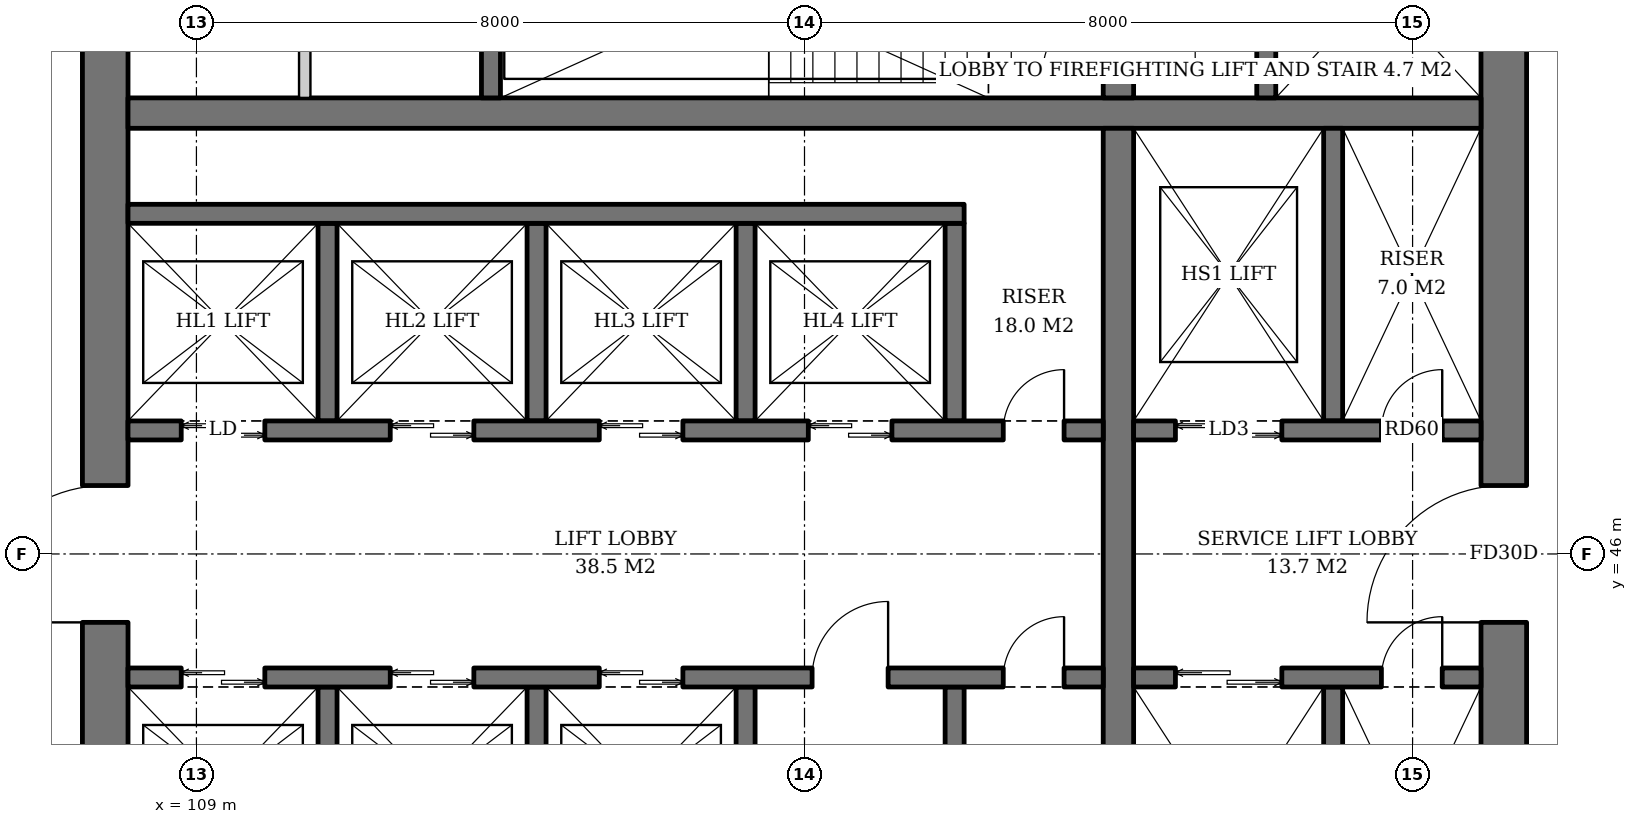
"""IFC4 building model, lengths in metres.
Left out: names, types, materials, properties, quantities, classifications, styles, units other than length and angle.
Written with IfcOpenShell. Run it as: python <this file> out.ifc"""

import sys

from ifc_helpers import new_model, si_unit, direction, frame, frame_2d, origin, place, context, subcontext, project, spatial, rectangle, extrude, element, fill, save


model = new_model("IFC4")
c1 = context("Model", 3, precision=1e-05, world=origin(), true_north=direction((0.0, 1.0)))
c2 = subcontext(c1, "Body", "Model", "MODEL_VIEW")
j1 = project(units=[si_unit("LENGTHUNIT", "METRE"), si_unit("PLANEANGLEUNIT", "RADIAN")], contexts=[c1])
p1 = place(None, origin())
s1 = spatial("IfcSite", under=j1, at=p1, CompositionType="ELEMENT")
p2 = place(p1, origin())
s2 = spatial("IfcBuilding", under=s1, at=p2, CompositionType="ELEMENT")
p3 = place(p2, frame((0.0, 0.0, 32.4)))
s3 = spatial("IfcBuildingStorey", under=s2, at=p3, CompositionType="ELEMENT", Elevation=32.4)
p4 = place(p3, frame((107.8, 37.1, 0.0), z_axis=(0.0, 0.0, 1.0), x_axis=(0.0, 1.0, 0.0)))
e1 = element("IfcWall", 1, at=p4, inside=s3, PredefinedType="SHEAR", context=c2, shape_type="SweptSolid", body=[
    extrude(rectangle(XDim=17.8, YDim=0.6, at=frame_2d((8.9, 0.0))), origin(), (0.0, 0.0, 1.0), 3.8),
])
p5 = place(p4, frame((8.0, 0.0, 0.0)))
e2 = element("IfcOpeningElement", 2, at=p5, cuts=e1, PredefinedType="OPENING", context=c2, shape_type="SweptSolid", body=[
    extrude(rectangle(XDim=1.8, YDim=2.4, at=frame_2d((0.9, 1.2))), frame((0.0, 0.31, 0.0), z_axis=(0.0, -1.0, 0.0), x_axis=(1.0, 0.0, 0.0)), (0.0, 0.0, 1.0), 0.62),
])
p6 = place(p3, frame((126.2, 37.1, 0.0), z_axis=(0.0, 0.0, 1.0), x_axis=(0.0, 1.0, 0.0)))
e3 = element("IfcWall", 3, at=p6, inside=s3, PredefinedType="SHEAR", context=c2, shape_type="SweptSolid", body=[
    extrude(rectangle(XDim=17.8, YDim=0.6, at=frame_2d((8.9, 0.0))), origin(), (0.0, 0.0, 1.0), 3.8),
])
p7 = place(p6, frame((8.0, 0.0, 0.0)))
e4 = element("IfcOpeningElement", 4, at=p7, cuts=e3, PredefinedType="OPENING", context=c2, shape_type="SweptSolid", body=[
    extrude(rectangle(XDim=1.8, YDim=2.4, at=frame_2d((0.9, 1.2))), frame((0.0, 0.31, 0.0), z_axis=(0.0, -1.0, 0.0), x_axis=(1.0, 0.0, 0.0)), (0.0, 0.0, 1.0), 0.62),
])
p8 = place(p3, frame((108.1, 51.8, 0.0), z_axis=(0.0, 0.0, 1.0), x_axis=(1.0, 0.0, 0.0)))
e5 = element("IfcWall", 5, at=p8, inside=s3, PredefinedType="SHEAR", context=c2, shape_type="SweptSolid", body=[
    extrude(rectangle(XDim=17.8, YDim=0.4, at=frame_2d((8.9, 0.0))), origin(), (0.0, 0.0, 1.0), 3.8),
])
p9 = place(p3, frame((121.13, 40.4, 0.0), z_axis=(0.0, 0.0, 1.0), x_axis=(0.0, 1.0, 0.0)))
e6 = element("IfcWall", 6, at=p9, inside=s3, PredefinedType="SHEAR", context=c2, shape_type="SweptSolid", body=[
    extrude(rectangle(XDim=11.2, YDim=0.4, at=frame_2d((5.6, 0.0))), origin(), (0.0, 0.0, 1.0), 3.8),
])
p10 = place(p3, frame((121.13, 52.0, 0.0), z_axis=(0.0, 0.0, 1.0), x_axis=(0.0, 1.0, 0.0)))
e7 = element("IfcWall", 7, at=p10, inside=s3, PredefinedType="SHEAR", context=c2, shape_type="SweptSolid", body=[
    extrude(rectangle(XDim=2.9, YDim=0.4, at=frame_2d((1.45, 0.0))), origin(), (0.0, 0.0, 1.0), 3.8),
])
p11 = place(p10, frame((0.3, 0.0, 0.0)))
e8 = element("IfcOpeningElement", 8, at=p11, cuts=e7, PredefinedType="OPENING", context=c2, shape_type="SweptSolid", body=[
    extrude(rectangle(XDim=1.0, YDim=2.1, at=frame_2d((0.5, 1.05))), frame((0.0, 0.21, 0.0), z_axis=(0.0, -1.0, 0.0), x_axis=(1.0, 0.0, 0.0)), (0.0, 0.0, 1.0), 0.42),
])
p12 = place(p3, frame((112.875, 52.0, 0.0), z_axis=(0.0, 0.0, 1.0), x_axis=(0.0, 1.0, 0.0)))
e9 = element("IfcWall", 9, at=p12, inside=s3, PredefinedType="SHEAR", context=c2, shape_type="SweptSolid", body=[
    extrude(rectangle(XDim=2.9, YDim=0.25, at=frame_2d((1.45, 0.0))), origin(), (0.0, 0.0, 1.0), 3.8),
])
p13 = place(p3, frame((123.075, 52.0, 0.0), z_axis=(0.0, 0.0, 1.0), x_axis=(0.0, 1.0, 0.0)))
e10 = element("IfcWall", 10, at=p13, inside=s3, PredefinedType="SHEAR", context=c2, shape_type="SweptSolid", body=[
    extrude(rectangle(XDim=2.9, YDim=0.25, at=frame_2d((1.45, 0.0))), origin(), (0.0, 0.0, 1.0), 3.8),
])
p14 = place(p13, frame((0.8, 0.0, 0.0)))
e11 = element("IfcOpeningElement", 11, at=p14, cuts=e10, PredefinedType="OPENING", context=c2, shape_type="SweptSolid", body=[
    extrude(rectangle(XDim=1.3, YDim=2.2, at=frame_2d((0.65, 1.1))), frame((0.0, 0.135, 0.0), z_axis=(0.0, -1.0, 0.0), x_axis=(1.0, 0.0, 0.0)), (0.0, 0.0, 1.0), 0.27),
])
for number, where, z_axis, x_axis in (
    (12, (110.725, 47.75, 0.0), (0.0, 0.0, 1.0), (0.0, 1.0, 0.0)),
    (13, (113.475, 47.75, 0.0), (0.0, 0.0, 1.0), (0.0, 1.0, 0.0)),
    (14, (116.225, 47.75, 0.0), (0.0, 0.0, 1.0), (0.0, 1.0, 0.0)),
    (15, (118.975, 47.75, 0.0), (0.0, 0.0, 1.0), (0.0, 1.0, 0.0)),
):
    element("IfcWall", number, at=place(p3, frame(where, z_axis=z_axis, x_axis=x_axis)), inside=s3, PredefinedType="SHEAR", context=c2, shape_type="SweptSolid", body=[
        extrude(rectangle(XDim=2.6, YDim=0.25, at=frame_2d((1.3, 0.0))), origin(), (0.0, 0.0, 1.0), 3.8),
    ])
p15 = place(p3, frame((108.1, 50.475, 0.0), z_axis=(0.0, 0.0, 1.0), x_axis=(1.0, 0.0, 0.0)))
e16 = element("IfcWall", 16, at=p15, inside=s3, PredefinedType="SHEAR", context=c2, shape_type="SweptSolid", body=[
    extrude(rectangle(XDim=11.0, YDim=0.25, at=frame_2d((5.5, 0.0))), origin(), (0.0, 0.0, 1.0), 3.8),
])
p16 = place(p3, frame((108.1, 47.625, 0.0), z_axis=(0.0, 0.0, 1.0), x_axis=(1.0, 0.0, 0.0)))
e17 = element("IfcWall", 17, at=p16, inside=s3, PredefinedType="SHEAR", context=c2, shape_type="SweptSolid", body=[
    extrude(rectangle(XDim=12.83, YDim=0.25, at=frame_2d((6.415, 0.0))), origin(), (0.0, 0.0, 1.0), 3.8),
])
p17 = place(p16, frame((0.7, 0.0, 0.0)))
e18 = element("IfcOpeningElement", 18, at=p17, cuts=e17, PredefinedType="OPENING", context=c2, shape_type="SweptSolid", body=[
    extrude(rectangle(XDim=1.1, YDim=2.2, at=frame_2d((0.55, 1.1))), frame((0.0, 0.135, 0.0), z_axis=(0.0, -1.0, 0.0), x_axis=(1.0, 0.0, 0.0)), (0.0, 0.0, 1.0), 0.27),
])
p18 = place(p16, frame((3.45, 0.0, 0.0)))
e19 = element("IfcOpeningElement", 19, at=p18, cuts=e17, PredefinedType="OPENING", context=c2, shape_type="SweptSolid", body=[
    extrude(rectangle(XDim=1.1, YDim=2.2, at=frame_2d((0.55, 1.1))), frame((0.0, 0.135, 0.0), z_axis=(0.0, -1.0, 0.0), x_axis=(1.0, 0.0, 0.0)), (0.0, 0.0, 1.0), 0.27),
])
p19 = place(p16, frame((6.2, 0.0, 0.0)))
e20 = element("IfcOpeningElement", 20, at=p19, cuts=e17, PredefinedType="OPENING", context=c2, shape_type="SweptSolid", body=[
    extrude(rectangle(XDim=1.1, YDim=2.2, at=frame_2d((0.55, 1.1))), frame((0.0, 0.135, 0.0), z_axis=(0.0, -1.0, 0.0), x_axis=(1.0, 0.0, 0.0)), (0.0, 0.0, 1.0), 0.27),
])
p20 = place(p16, frame((8.95, 0.0, 0.0)))
e21 = element("IfcOpeningElement", 21, at=p20, cuts=e17, PredefinedType="OPENING", context=c2, shape_type="SweptSolid", body=[
    extrude(rectangle(XDim=1.1, YDim=2.2, at=frame_2d((0.55, 1.1))), frame((0.0, 0.135, 0.0), z_axis=(0.0, -1.0, 0.0), x_axis=(1.0, 0.0, 0.0)), (0.0, 0.0, 1.0), 0.27),
])
p21 = place(p16, frame((11.515, 0.0, 0.0)))
e22 = element("IfcOpeningElement", 22, at=p21, cuts=e17, PredefinedType="OPENING", context=c2, shape_type="SweptSolid", body=[
    extrude(rectangle(XDim=0.8, YDim=2.0, at=frame_2d((0.4, 1.0))), frame((0.0, 0.135, 0.0), z_axis=(0.0, -1.0, 0.0), x_axis=(1.0, 0.0, 0.0)), (0.0, 0.0, 1.0), 0.27),
])
for number, where, z_axis, x_axis in (
    (23, (110.725, 44.25, 0.0), (0.0, 0.0, 1.0), (0.0, -1.0, 0.0)),
    (24, (113.475, 44.25, 0.0), (0.0, 0.0, 1.0), (0.0, -1.0, 0.0)),
    (25, (116.225, 44.25, 0.0), (0.0, 0.0, 1.0), (0.0, -1.0, 0.0)),
    (26, (118.975, 44.25, 0.0), (0.0, 0.0, 1.0), (0.0, -1.0, 0.0)),
):
    element("IfcWall", number, at=place(p3, frame(where, z_axis=z_axis, x_axis=x_axis)), inside=s3, PredefinedType="SHEAR", context=c2, shape_type="SweptSolid", body=[
        extrude(rectangle(XDim=2.6, YDim=0.25, at=frame_2d((1.3, 0.0))), origin(), (0.0, 0.0, 1.0), 3.8),
    ])
p22 = place(p3, frame((108.1, 44.375, 0.0), z_axis=(0.0, 0.0, 1.0), x_axis=(1.0, 0.0, 0.0)))
e27 = element("IfcWall", 27, at=p22, inside=s3, PredefinedType="SHEAR", context=c2, shape_type="SweptSolid", body=[
    extrude(rectangle(XDim=12.83, YDim=0.25, at=frame_2d((6.415, 0.0))), origin(), (0.0, 0.0, 1.0), 3.8),
])
p23 = place(p22, frame((0.7, 0.0, 0.0)))
e28 = element("IfcOpeningElement", 28, at=p23, cuts=e27, PredefinedType="OPENING", context=c2, shape_type="SweptSolid", body=[
    extrude(rectangle(XDim=1.1, YDim=2.2, at=frame_2d((0.55, 1.1))), frame((0.0, 0.135, 0.0), z_axis=(0.0, -1.0, 0.0), x_axis=(1.0, 0.0, 0.0)), (0.0, 0.0, 1.0), 0.27),
])
p24 = place(p22, frame((3.45, 0.0, 0.0)))
e29 = element("IfcOpeningElement", 29, at=p24, cuts=e27, PredefinedType="OPENING", context=c2, shape_type="SweptSolid", body=[
    extrude(rectangle(XDim=1.1, YDim=2.2, at=frame_2d((0.55, 1.1))), frame((0.0, 0.135, 0.0), z_axis=(0.0, -1.0, 0.0), x_axis=(1.0, 0.0, 0.0)), (0.0, 0.0, 1.0), 0.27),
])
p25 = place(p22, frame((6.2, 0.0, 0.0)))
e30 = element("IfcOpeningElement", 30, at=p25, cuts=e27, PredefinedType="OPENING", context=c2, shape_type="SweptSolid", body=[
    extrude(rectangle(XDim=1.1, YDim=2.2, at=frame_2d((0.55, 1.1))), frame((0.0, 0.135, 0.0), z_axis=(0.0, -1.0, 0.0), x_axis=(1.0, 0.0, 0.0)), (0.0, 0.0, 1.0), 0.27),
])
p26 = place(p22, frame((9.0, 0.0, 0.0)))
e31 = element("IfcOpeningElement", 31, at=p26, cuts=e27, PredefinedType="OPENING", context=c2, shape_type="SweptSolid", body=[
    extrude(rectangle(XDim=1.0, YDim=2.1, at=frame_2d((0.5, 1.05))), frame((0.0, 0.135, 0.0), z_axis=(0.0, -1.0, 0.0), x_axis=(1.0, 0.0, 0.0)), (0.0, 0.0, 1.0), 0.27),
])
p27 = place(p22, frame((11.515, 0.0, 0.0)))
e32 = element("IfcOpeningElement", 32, at=p27, cuts=e27, PredefinedType="OPENING", context=c2, shape_type="SweptSolid", body=[
    extrude(rectangle(XDim=0.8, YDim=2.0, at=frame_2d((0.4, 1.0))), frame((0.0, 0.135, 0.0), z_axis=(0.0, -1.0, 0.0), x_axis=(1.0, 0.0, 0.0)), (0.0, 0.0, 1.0), 0.27),
])
p28 = place(p3, frame((123.955, 47.75, 0.0), z_axis=(0.0, 0.0, 1.0), x_axis=(0.0, 1.0, 0.0)))
e33 = element("IfcWall", 33, at=p28, inside=s3, PredefinedType="SHEAR", context=c2, shape_type="SweptSolid", body=[
    extrude(rectangle(XDim=3.85, YDim=0.25, at=frame_2d((1.925, 0.0))), origin(), (0.0, 0.0, 1.0), 3.8),
])
p29 = place(p3, frame((121.33, 47.625, 0.0), z_axis=(0.0, 0.0, 1.0), x_axis=(1.0, 0.0, 0.0)))
e34 = element("IfcWall", 34, at=p29, inside=s3, PredefinedType="SHEAR", context=c2, shape_type="SweptSolid", body=[
    extrude(rectangle(XDim=4.57, YDim=0.25, at=frame_2d((2.285, 0.0))), origin(), (0.0, 0.0, 1.0), 3.8),
])
p30 = place(p29, frame((0.55, 0.0, 0.0)))
e35 = element("IfcOpeningElement", 35, at=p30, cuts=e34, PredefinedType="OPENING", context=c2, shape_type="SweptSolid", body=[
    extrude(rectangle(XDim=1.4, YDim=2.4, at=frame_2d((0.7, 1.2))), frame((0.0, 0.135, 0.0), z_axis=(0.0, -1.0, 0.0), x_axis=(1.0, 0.0, 0.0)), (0.0, 0.0, 1.0), 0.27),
])
p31 = place(p29, frame((3.26, 0.0, 0.0)))
e36 = element("IfcOpeningElement", 36, at=p31, cuts=e34, PredefinedType="OPENING", context=c2, shape_type="SweptSolid", body=[
    extrude(rectangle(XDim=0.8, YDim=2.0, at=frame_2d((0.4, 1.0))), frame((0.0, 0.135, 0.0), z_axis=(0.0, -1.0, 0.0), x_axis=(1.0, 0.0, 0.0)), (0.0, 0.0, 1.0), 0.27),
])
p32 = place(p3, frame((123.955, 44.25, 0.0), z_axis=(0.0, 0.0, 1.0), x_axis=(0.0, -1.0, 0.0)))
e37 = element("IfcWall", 37, at=p32, inside=s3, PredefinedType="SHEAR", context=c2, shape_type="SweptSolid", body=[
    extrude(rectangle(XDim=3.85, YDim=0.25, at=frame_2d((1.925, 0.0))), origin(), (0.0, 0.0, 1.0), 3.8),
])
p33 = place(p3, frame((121.33, 44.375, 0.0), z_axis=(0.0, 0.0, 1.0), x_axis=(1.0, 0.0, 0.0)))
e38 = element("IfcWall", 38, at=p33, inside=s3, PredefinedType="SHEAR", context=c2, shape_type="SweptSolid", body=[
    extrude(rectangle(XDim=4.57, YDim=0.25, at=frame_2d((2.285, 0.0))), origin(), (0.0, 0.0, 1.0), 3.8),
])
p34 = place(p33, frame((0.55, 0.0, 0.0)))
e39 = element("IfcOpeningElement", 39, at=p34, cuts=e38, PredefinedType="OPENING", context=c2, shape_type="SweptSolid", body=[
    extrude(rectangle(XDim=1.4, YDim=2.4, at=frame_2d((0.7, 1.2))), frame((0.0, 0.135, 0.0), z_axis=(0.0, -1.0, 0.0), x_axis=(1.0, 0.0, 0.0)), (0.0, 0.0, 1.0), 0.27),
])
p35 = place(p33, frame((3.26, 0.0, 0.0)))
e40 = element("IfcOpeningElement", 40, at=p35, cuts=e38, PredefinedType="OPENING", context=c2, shape_type="SweptSolid", body=[
    extrude(rectangle(XDim=0.8, YDim=2.0, at=frame_2d((0.4, 1.0))), frame((0.0, 0.135, 0.0), z_axis=(0.0, -1.0, 0.0), x_axis=(1.0, 0.0, 0.0)), (0.0, 0.0, 1.0), 0.27),
])
p36 = place(p3, frame((110.425, 52.0, 0.0), z_axis=(0.0, 0.0, 1.0), x_axis=(0.0, 1.0, 0.0)))
e41 = element("IfcWall", 41, at=p36, inside=s3, PredefinedType="SOLIDWALL", context=c2, shape_type="SweptSolid", body=[
    extrude(rectangle(XDim=2.9, YDim=0.15, at=frame_2d((1.45, 0.0))), origin(), (0.0, 0.0, 1.0), 3.6),
])
p37 = place(p17, origin())
e42 = element("IfcDoor", 42, at=p37, inside=s3, OperationType="DOUBLE_DOOR_SLIDING", PredefinedType="DOOR", context=c2, shape_type="SweptSolid", body=[
    extrude(rectangle(XDim=1.1, YDim=2.2, at=frame_2d((0.55, 1.1))), frame((0.0, 0.025, 0.0), z_axis=(0.0, -1.0, 0.0), x_axis=(1.0, 0.0, 0.0)), (0.0, 0.0, 1.0), 0.05),
])
fill(e18, e42)
p38 = place(p18, origin())
e43 = element("IfcDoor", 43, at=p38, inside=s3, OperationType="DOUBLE_DOOR_SLIDING", PredefinedType="DOOR", context=c2, shape_type="SweptSolid", body=[
    extrude(rectangle(XDim=1.1, YDim=2.2, at=frame_2d((0.55, 1.1))), frame((0.0, 0.025, 0.0), z_axis=(0.0, -1.0, 0.0), x_axis=(1.0, 0.0, 0.0)), (0.0, 0.0, 1.0), 0.05),
])
fill(e19, e43)
p39 = place(p19, origin())
e44 = element("IfcDoor", 44, at=p39, inside=s3, OperationType="DOUBLE_DOOR_SLIDING", PredefinedType="DOOR", context=c2, shape_type="SweptSolid", body=[
    extrude(rectangle(XDim=1.1, YDim=2.2, at=frame_2d((0.55, 1.1))), frame((0.0, 0.025, 0.0), z_axis=(0.0, -1.0, 0.0), x_axis=(1.0, 0.0, 0.0)), (0.0, 0.0, 1.0), 0.05),
])
fill(e20, e44)
p40 = place(p20, origin())
e45 = element("IfcDoor", 45, at=p40, inside=s3, OperationType="DOUBLE_DOOR_SLIDING", PredefinedType="DOOR", context=c2, shape_type="SweptSolid", body=[
    extrude(rectangle(XDim=1.1, YDim=2.2, at=frame_2d((0.55, 1.1))), frame((0.0, 0.025, 0.0), z_axis=(0.0, -1.0, 0.0), x_axis=(1.0, 0.0, 0.0)), (0.0, 0.0, 1.0), 0.05),
])
fill(e21, e45)
p41 = place(p21, origin())
e46 = element("IfcDoor", 46, at=p41, inside=s3, OperationType="SINGLE_SWING_RIGHT", PredefinedType="DOOR", context=c2, shape_type="SweptSolid", body=[
    extrude(rectangle(XDim=0.8, YDim=2.0, at=frame_2d((0.4, 1.0))), frame((0.0, 0.025, 0.0), z_axis=(0.0, -1.0, 0.0), x_axis=(1.0, 0.0, 0.0)), (0.0, 0.0, 1.0), 0.05),
])
fill(e22, e46)
p42 = place(p23, origin())
e47 = element("IfcDoor", 47, at=p42, inside=s3, OperationType="DOUBLE_DOOR_SLIDING", PredefinedType="DOOR", context=c2, shape_type="SweptSolid", body=[
    extrude(rectangle(XDim=1.1, YDim=2.2, at=frame_2d((0.55, 1.1))), frame((0.0, 0.025, 0.0), z_axis=(0.0, -1.0, 0.0), x_axis=(1.0, 0.0, 0.0)), (0.0, 0.0, 1.0), 0.05),
])
fill(e28, e47)
p43 = place(p24, origin())
e48 = element("IfcDoor", 48, at=p43, inside=s3, OperationType="DOUBLE_DOOR_SLIDING", PredefinedType="DOOR", context=c2, shape_type="SweptSolid", body=[
    extrude(rectangle(XDim=1.1, YDim=2.2, at=frame_2d((0.55, 1.1))), frame((0.0, 0.025, 0.0), z_axis=(0.0, -1.0, 0.0), x_axis=(1.0, 0.0, 0.0)), (0.0, 0.0, 1.0), 0.05),
])
fill(e29, e48)
p44 = place(p25, origin())
e49 = element("IfcDoor", 49, at=p44, inside=s3, OperationType="DOUBLE_DOOR_SLIDING", PredefinedType="DOOR", context=c2, shape_type="SweptSolid", body=[
    extrude(rectangle(XDim=1.1, YDim=2.2, at=frame_2d((0.55, 1.1))), frame((0.0, 0.025, 0.0), z_axis=(0.0, -1.0, 0.0), x_axis=(1.0, 0.0, 0.0)), (0.0, 0.0, 1.0), 0.05),
])
fill(e30, e49)
p45 = place(p26, origin())
e50 = element("IfcDoor", 50, at=p45, inside=s3, OperationType="SINGLE_SWING_RIGHT", PredefinedType="DOOR", context=c2, shape_type="SweptSolid", body=[
    extrude(rectangle(XDim=1.0, YDim=2.1, at=frame_2d((0.5, 1.05))), frame((0.0, 0.025, 0.0), z_axis=(0.0, -1.0, 0.0), x_axis=(1.0, 0.0, 0.0)), (0.0, 0.0, 1.0), 0.05),
])
fill(e31, e50)
p46 = place(p27, origin())
e51 = element("IfcDoor", 51, at=p46, inside=s3, OperationType="SINGLE_SWING_RIGHT", PredefinedType="DOOR", context=c2, shape_type="SweptSolid", body=[
    extrude(rectangle(XDim=0.8, YDim=2.0, at=frame_2d((0.4, 1.0))), frame((0.0, 0.025, 0.0), z_axis=(0.0, -1.0, 0.0), x_axis=(1.0, 0.0, 0.0)), (0.0, 0.0, 1.0), 0.05),
])
fill(e32, e51)
p47 = place(p30, origin())
e52 = element("IfcDoor", 52, at=p47, inside=s3, OperationType="DOUBLE_DOOR_SLIDING", PredefinedType="DOOR", context=c2, shape_type="SweptSolid", body=[
    extrude(rectangle(XDim=1.4, YDim=2.4, at=frame_2d((0.7, 1.2))), frame((0.0, 0.025, 0.0), z_axis=(0.0, -1.0, 0.0), x_axis=(1.0, 0.0, 0.0)), (0.0, 0.0, 1.0), 0.05),
])
fill(e35, e52)
p48 = place(p31, origin())
e53 = element("IfcDoor", 53, at=p48, inside=s3, OperationType="SINGLE_SWING_RIGHT", PredefinedType="DOOR", context=c2, shape_type="SweptSolid", body=[
    extrude(rectangle(XDim=0.8, YDim=2.0, at=frame_2d((0.4, 1.0))), frame((0.0, 0.025, 0.0), z_axis=(0.0, -1.0, 0.0), x_axis=(1.0, 0.0, 0.0)), (0.0, 0.0, 1.0), 0.05),
])
fill(e36, e53)
p49 = place(p34, origin())
e54 = element("IfcDoor", 54, at=p49, inside=s3, OperationType="DOUBLE_DOOR_SLIDING", PredefinedType="DOOR", context=c2, shape_type="SweptSolid", body=[
    extrude(rectangle(XDim=1.4, YDim=2.4, at=frame_2d((0.7, 1.2))), frame((0.0, 0.025, 0.0), z_axis=(0.0, -1.0, 0.0), x_axis=(1.0, 0.0, 0.0)), (0.0, 0.0, 1.0), 0.05),
])
fill(e39, e54)
p50 = place(p35, origin())
e55 = element("IfcDoor", 55, at=p50, inside=s3, OperationType="SINGLE_SWING_RIGHT", PredefinedType="DOOR", context=c2, shape_type="SweptSolid", body=[
    extrude(rectangle(XDim=0.8, YDim=2.0, at=frame_2d((0.4, 1.0))), frame((0.0, 0.025, 0.0), z_axis=(0.0, -1.0, 0.0), x_axis=(1.0, 0.0, 0.0)), (0.0, 0.0, 1.0), 0.05),
])
fill(e40, e55)
p51 = place(p11, origin())
e56 = element("IfcDoor", 56, at=p51, inside=s3, OperationType="SINGLE_SWING_LEFT", PredefinedType="DOOR", context=c2, shape_type="SweptSolid", body=[
    extrude(rectangle(XDim=1.0, YDim=2.1, at=frame_2d((0.5, 1.05))), frame((0.0, 0.025, 0.0), z_axis=(0.0, -1.0, 0.0), x_axis=(1.0, 0.0, 0.0)), (0.0, 0.0, 1.0), 0.05),
])
fill(e8, e56)
p52 = place(p5, origin())
e57 = element("IfcDoor", 57, at=p52, inside=s3, OperationType="DOUBLE_DOOR_SINGLE_SWING", PredefinedType="DOOR", context=c2, shape_type="SweptSolid", body=[
    extrude(rectangle(XDim=1.8, YDim=2.4, at=frame_2d((0.9, 1.2))), frame((0.0, 0.025, 0.0), z_axis=(0.0, -1.0, 0.0), x_axis=(1.0, 0.0, 0.0)), (0.0, 0.0, 1.0), 0.05),
])
fill(e2, e57)
p53 = place(p7, origin())
e58 = element("IfcDoor", 58, at=p53, inside=s3, OperationType="DOUBLE_DOOR_SINGLE_SWING", PredefinedType="DOOR", context=c2, shape_type="SweptSolid", body=[
    extrude(rectangle(XDim=1.8, YDim=2.4, at=frame_2d((0.9, 1.2))), frame((0.0, 0.025, 0.0), z_axis=(0.0, -1.0, 0.0), x_axis=(1.0, 0.0, 0.0)), (0.0, 0.0, 1.0), 0.05),
])
fill(e4, e58)
save(model, sys.argv[1])
